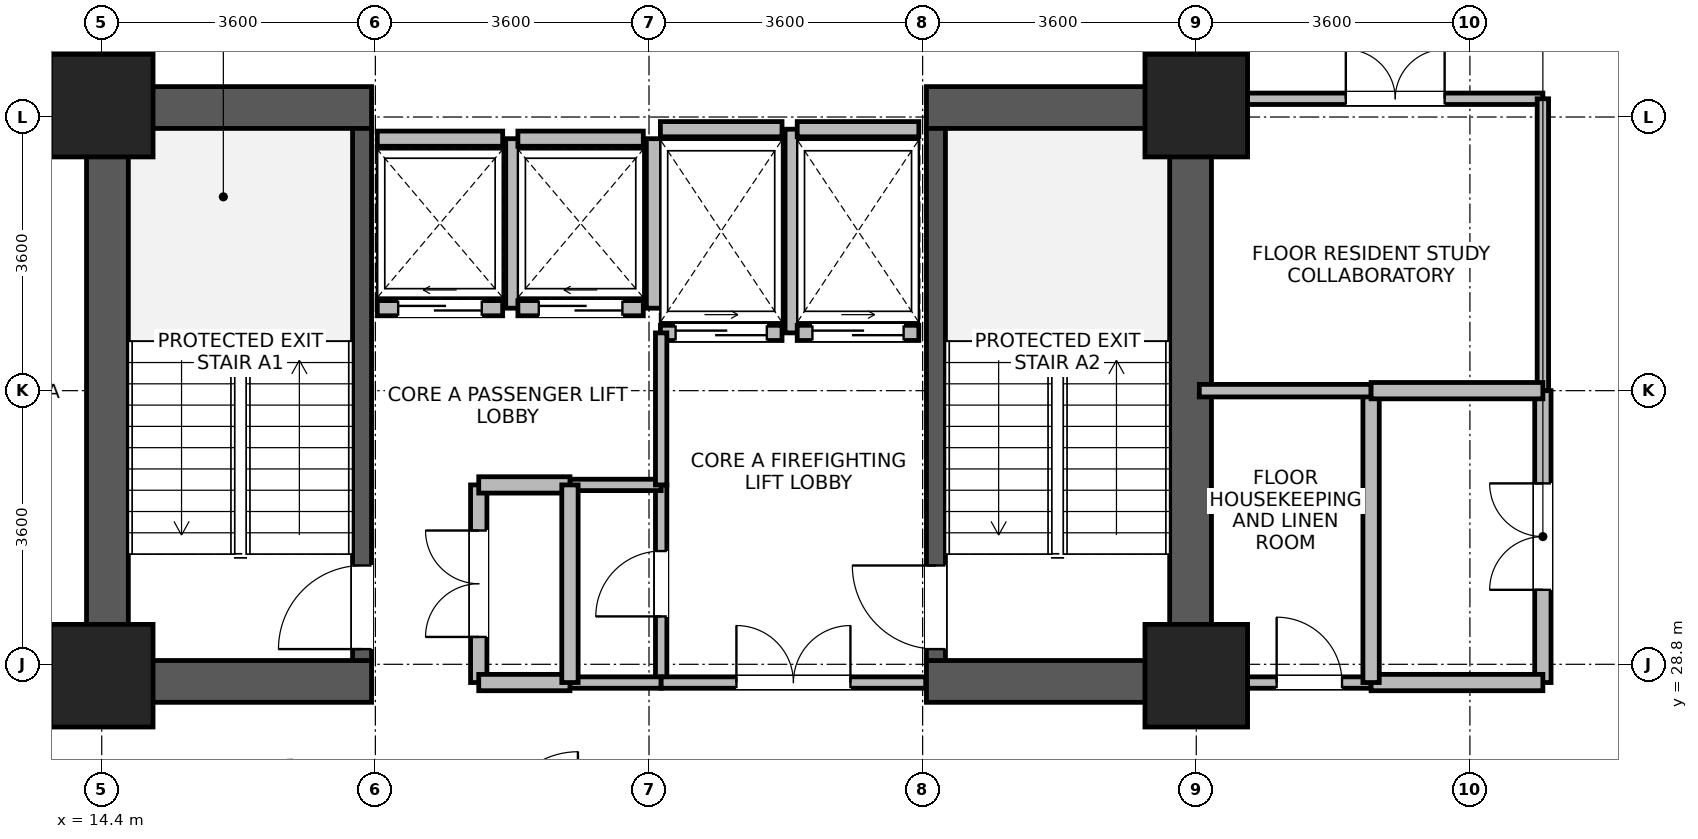
"""IFC4 building model, lengths in metres.
Left out: names, types, materials, properties, quantities, classifications, styles, units other than length and angle.
Written with IfcOpenShell. Run it as: python <this file> out.ifc"""

import sys

from ifc_helpers import new_model, si_unit, direction, frame, frame_2d, origin, origin_2d, place, context, subcontext, project, spatial, rectangle, extrude, source, transform, mapped, element, fill, save


model = new_model("IFC4")
c1 = context("Model", 3, precision=1e-05, world=origin(), true_north=direction((0.0, 1.0)))
c2 = subcontext(c1, "Body", "Model", "MODEL_VIEW")
j1 = project(units=[si_unit("LENGTHUNIT", "METRE"), si_unit("PLANEANGLEUNIT", "RADIAN")], contexts=[c1])
p1 = place(None, origin())
s1 = spatial("IfcSite", under=j1, at=p1, CompositionType="ELEMENT")
p2 = place(p1, origin())
s2 = spatial("IfcBuilding", under=s1, at=p2, CompositionType="ELEMENT")
p3 = place(p2, frame((0.0, 0.0, 47.5)))
s3 = spatial("IfcBuildingStorey", under=s2, at=p3, CompositionType="ELEMENT", Elevation=47.5)
for number, where, z_axis, x_axis in (
    (1, (14.475, 28.3, 0.0), (0.0, 0.0, 1.0), (0.0, 1.0, 0.0)),
    (2, (28.725, 28.3, 0.0), (0.0, 0.0, 1.0), (0.0, 1.0, 0.0)),
):
    element("IfcWall", number, at=place(p3, frame(where, z_axis=z_axis, x_axis=x_axis)), inside=s3, PredefinedType="SHEAR", context=c2, shape_type="SweptSolid", body=[
        extrude(rectangle(XDim=8.1, YDim=0.55, at=frame_2d((4.05, 0.0))), origin(), (0.0, 0.0, 1.0), 3.45),
    ])
for number, where, z_axis, x_axis in (
    (3, (14.75, 28.575, 0.0), (0.0, 0.0, 1.0), (1.0, 0.0, 0.0)),
    (4, (25.25, 28.575, 0.0), (0.0, 0.0, 1.0), (1.0, 0.0, 0.0)),
    (5, (14.75, 36.125, 0.0), (0.0, 0.0, 1.0), (1.0, 0.0, 0.0)),
    (6, (25.25, 36.125, 0.0), (0.0, 0.0, 1.0), (1.0, 0.0, 0.0)),
):
    element("IfcWall", number, at=place(p3, frame(where, z_axis=z_axis, x_axis=x_axis)), inside=s3, PredefinedType="SHEAR", context=c2, shape_type="SweptSolid", body=[
        extrude(rectangle(XDim=3.2, YDim=0.55, at=frame_2d((1.6, 0.0))), origin(), (0.0, 0.0, 1.0), 3.45),
    ])
p4 = place(p3, frame((17.825, 28.85, 0.0), z_axis=(0.0, 0.0, 1.0), x_axis=(0.0, 1.0, 0.0)))
e7 = element("IfcWall", 7, at=p4, inside=s3, PredefinedType="SHEAR", context=c2, shape_type="SweptSolid", body=[
    extrude(rectangle(XDim=7.0, YDim=0.25, at=frame_2d((3.5, 0.0))), origin(), (0.0, 0.0, 1.0), 3.45),
])
p5 = place(p4, frame((0.15, 0.0, 0.0)))
e8 = element("IfcOpeningElement", 8, at=p5, cuts=e7, PredefinedType="OPENING", context=c2, shape_type="SweptSolid", body=[
    extrude(rectangle(XDim=1.1, YDim=2.08, at=frame_2d((0.55, 1.04))), frame((0.0, 0.135, 0.0), z_axis=(0.0, -1.0, 0.0), x_axis=(1.0, 0.0, 0.0)), (0.0, 0.0, 1.0), 0.27),
])
p6 = place(p3, frame((25.375, 28.85, 0.0), z_axis=(0.0, 0.0, 1.0), x_axis=(0.0, 1.0, 0.0)))
e9 = element("IfcWall", 9, at=p6, inside=s3, PredefinedType="SHEAR", context=c2, shape_type="SweptSolid", body=[
    extrude(rectangle(XDim=7.0, YDim=0.25, at=frame_2d((3.5, 0.0))), origin(), (0.0, 0.0, 1.0), 3.45),
])
p7 = place(p6, frame((0.15, 0.0, 0.0)))
e10 = element("IfcOpeningElement", 10, at=p7, cuts=e9, PredefinedType="OPENING", context=c2, shape_type="SweptSolid", body=[
    extrude(rectangle(XDim=1.1, YDim=2.08, at=frame_2d((0.55, 1.04))), frame((0.0, 0.135, 0.0), z_axis=(0.0, -1.0, 0.0), x_axis=(1.0, 0.0, 0.0)), (0.0, 0.0, 1.0), 0.27),
])
m1 = source(origin(), c2, "Body", "SweptSolid", [
    extrude(rectangle(XDim=1.35, YDim=1.35, at=origin_2d()), origin(), (0.0, 0.0, 1.0), 3.7),
])
for number, where, z_axis, x_axis in (
    (11, (14.4, 28.65, 0.0), (0.0, 0.0, 1.0), (1.0, 0.0, 0.0)),
    (12, (14.4, 36.15, 0.0), (0.0, 0.0, 1.0), (1.0, 0.0, 0.0)),
    (13, (28.8, 28.65, 0.0), (0.0, 0.0, 1.0), (1.0, 0.0, 0.0)),
    (14, (28.8, 36.15, 0.0), (0.0, 0.0, 1.0), (1.0, 0.0, 0.0)),
):
    element("IfcColumn", number, at=place(p3, frame(where, z_axis=z_axis, x_axis=x_axis)), inside=s3, PredefinedType="COLUMN", context=c2, shape_type="MappedRepresentation", body=[
        mapped(m1, transform((0.0, 0.0, 0.0), x_axis=(1.0, 0.0, 0.0), y_axis=(0.0, 1.0, 0.0), z_axis=(0.0, 0.0, 1.0), scale=1.0)),
    ])
p8 = place(p3, frame((18.025, 33.485, 0.0), z_axis=(0.0, 0.0, 1.0), x_axis=(1.0, 0.0, 0.0)))
e15 = element("IfcWall", 15, at=p8, inside=s3, PredefinedType="PARTITIONING", context=c2, shape_type="SweptSolid", body=[
    extrude(rectangle(XDim=1.65, YDim=0.2, at=frame_2d((0.825, 0.0))), origin(), (0.0, 0.0, 1.0), 3.43),
])
p9 = place(p8, frame((0.275, 0.0, 0.0)))
e16 = element("IfcOpeningElement", 16, at=p9, cuts=e15, PredefinedType="OPENING", context=c2, shape_type="SweptSolid", body=[
    extrude(rectangle(XDim=1.1, YDim=2.12, at=frame_2d((0.55, 1.06))), frame((0.0, 0.11, 0.0), z_axis=(0.0, -1.0, 0.0), x_axis=(1.0, 0.0, 0.0)), (0.0, 0.0, 1.0), 0.22),
])
p10 = place(p3, frame((18.025, 35.715, 0.0), z_axis=(0.0, 0.0, 1.0), x_axis=(1.0, 0.0, 0.0)))
e17 = element("IfcWall", 17, at=p10, inside=s3, PredefinedType="PARTITIONING", context=c2, shape_type="SweptSolid", body=[
    extrude(rectangle(XDim=1.65, YDim=0.2, at=frame_2d((0.825, 0.0))), origin(), (0.0, 0.0, 1.0), 2.23),
])
p11 = place(p3, frame((19.815, 33.485, 0.0), z_axis=(0.0, 0.0, 1.0), x_axis=(0.0, 1.0, 0.0)))
e18 = element("IfcWall", 18, at=p11, inside=s3, PredefinedType="PARTITIONING", context=c2, shape_type="SweptSolid", body=[
    extrude(rectangle(XDim=2.23, YDim=0.2, at=frame_2d((1.115, 0.0))), origin(), (0.0, 0.0, 1.0), 3.43),
])
p12 = place(p3, frame((19.875, 33.485, 0.0), z_axis=(0.0, 0.0, 1.0), x_axis=(1.0, 0.0, 0.0)))
e19 = element("IfcWall", 19, at=p12, inside=s3, PredefinedType="PARTITIONING", context=c2, shape_type="SweptSolid", body=[
    extrude(rectangle(XDim=1.65, YDim=0.2, at=frame_2d((0.825, 0.0))), origin(), (0.0, 0.0, 1.0), 3.43),
])
p13 = place(p12, frame((0.275, 0.0, 0.0)))
e20 = element("IfcOpeningElement", 20, at=p13, cuts=e19, PredefinedType="OPENING", context=c2, shape_type="SweptSolid", body=[
    extrude(rectangle(XDim=1.1, YDim=2.12, at=frame_2d((0.55, 1.06))), frame((0.0, 0.11, 0.0), z_axis=(0.0, -1.0, 0.0), x_axis=(1.0, 0.0, 0.0)), (0.0, 0.0, 1.0), 0.22),
])
p14 = place(p3, frame((19.875, 35.715, 0.0), z_axis=(0.0, 0.0, 1.0), x_axis=(1.0, 0.0, 0.0)))
e21 = element("IfcWall", 21, at=p14, inside=s3, PredefinedType="PARTITIONING", context=c2, shape_type="SweptSolid", body=[
    extrude(rectangle(XDim=1.65, YDim=0.2, at=frame_2d((0.825, 0.0))), origin(), (0.0, 0.0, 1.0), 2.23),
])
p15 = place(p3, frame((21.665, 33.485, 0.0), z_axis=(0.0, 0.0, 1.0), x_axis=(0.0, 1.0, 0.0)))
e22 = element("IfcWall", 22, at=p15, inside=s3, PredefinedType="PARTITIONING", context=c2, shape_type="SweptSolid", body=[
    extrude(rectangle(XDim=2.23, YDim=0.2, at=frame_2d((1.115, 0.0))), origin(), (0.0, 0.0, 1.0), 3.43),
])
p16 = place(p3, frame((21.75, 33.16, 0.0), z_axis=(0.0, 0.0, 1.0), x_axis=(1.0, 0.0, 0.0)))
e23 = element("IfcWall", 23, at=p16, inside=s3, PredefinedType="PARTITIONING", context=c2, shape_type="SweptSolid", body=[
    extrude(rectangle(XDim=1.6, YDim=0.2, at=frame_2d((0.8, 0.0))), origin(), (0.0, 0.0, 1.0), 3.43),
])
p17 = place(p16, frame((0.2, 0.0, 0.0)))
e24 = element("IfcOpeningElement", 24, at=p17, cuts=e23, PredefinedType="OPENING", context=c2, shape_type="SweptSolid", body=[
    extrude(rectangle(XDim=1.2, YDim=2.12, at=frame_2d((0.6, 1.06))), frame((0.0, 0.11, 0.0), z_axis=(0.0, -1.0, 0.0), x_axis=(1.0, 0.0, 0.0)), (0.0, 0.0, 1.0), 0.22),
])
p18 = place(p3, frame((21.75, 35.84, 0.0), z_axis=(0.0, 0.0, 1.0), x_axis=(1.0, 0.0, 0.0)))
e25 = element("IfcWall", 25, at=p18, inside=s3, PredefinedType="PARTITIONING", context=c2, shape_type="SweptSolid", body=[
    extrude(rectangle(XDim=1.6, YDim=0.2, at=frame_2d((0.8, 0.0))), origin(), (0.0, 0.0, 1.0), 2.23),
])
p19 = place(p3, frame((23.49, 33.16, 0.0), z_axis=(0.0, 0.0, 1.0), x_axis=(0.0, 1.0, 0.0)))
e26 = element("IfcWall", 26, at=p19, inside=s3, PredefinedType="PARTITIONING", context=c2, shape_type="SweptSolid", body=[
    extrude(rectangle(XDim=2.68, YDim=0.2, at=frame_2d((1.34, 0.0))), origin(), (0.0, 0.0, 1.0), 3.43),
])
p20 = place(p3, frame((23.55, 33.16, 0.0), z_axis=(0.0, 0.0, 1.0), x_axis=(1.0, 0.0, 0.0)))
e27 = element("IfcWall", 27, at=p20, inside=s3, PredefinedType="PARTITIONING", context=c2, shape_type="SweptSolid", body=[
    extrude(rectangle(XDim=1.6, YDim=0.2, at=frame_2d((0.8, 0.0))), origin(), (0.0, 0.0, 1.0), 3.43),
])
p21 = place(p20, frame((0.2, 0.0, 0.0)))
e28 = element("IfcOpeningElement", 28, at=p21, cuts=e27, PredefinedType="OPENING", context=c2, shape_type="SweptSolid", body=[
    extrude(rectangle(XDim=1.2, YDim=2.12, at=frame_2d((0.6, 1.06))), frame((0.0, 0.11, 0.0), z_axis=(0.0, -1.0, 0.0), x_axis=(1.0, 0.0, 0.0)), (0.0, 0.0, 1.0), 0.22),
])
p22 = place(p3, frame((23.55, 35.84, 0.0), z_axis=(0.0, 0.0, 1.0), x_axis=(1.0, 0.0, 0.0)))
e29 = element("IfcWall", 29, at=p22, inside=s3, PredefinedType="PARTITIONING", context=c2, shape_type="SweptSolid", body=[
    extrude(rectangle(XDim=1.6, YDim=0.2, at=frame_2d((0.8, 0.0))), origin(), (0.0, 0.0, 1.0), 2.23),
])
p23 = place(p3, frame((29.475, 36.24, 0.0), z_axis=(0.0, 0.0, 1.0), x_axis=(1.0, 0.0, 0.0)))
e30 = element("IfcWall", 30, at=p23, inside=s3, PredefinedType="PARTITIONING", context=c2, shape_type="SweptSolid", body=[
    extrude(rectangle(XDim=3.885, YDim=0.15, at=frame_2d((1.942, 0.0))), origin(), (0.0, 0.0, 1.0), 2.78),
])
p24 = place(p23, frame((1.292, 0.0, 0.0)))
e31 = element("IfcOpeningElement", 31, at=p24, cuts=e30, PredefinedType="OPENING", context=c2, shape_type="SweptSolid", body=[
    extrude(rectangle(XDim=1.3, YDim=2.12, at=frame_2d((0.65, 1.06))), frame((0.0, 0.085, 0.0), z_axis=(0.0, -1.0, 0.0), x_axis=(1.0, 0.0, 0.0)), (0.0, 0.0, 1.0), 0.17),
])
p25 = place(p3, frame((33.36, 32.4, 0.0), z_axis=(0.0, 0.0, 1.0), x_axis=(0.0, 1.0, 0.0)))
e32 = element("IfcWall", 32, at=p25, inside=s3, PredefinedType="PARTITIONING", context=c2, shape_type="SweptSolid", body=[
    extrude(rectangle(XDim=3.84, YDim=0.15, at=frame_2d((1.92, 0.0))), origin(), (0.0, 0.0, 1.0), 3.43),
])
p26 = place(p3, frame((33.36, 28.56, 0.0), z_axis=(0.0, 0.0, 1.0), x_axis=(0.0, 1.0, 0.0)))
e33 = element("IfcWall", 33, at=p26, inside=s3, PredefinedType="PARTITIONING", context=c2, shape_type="SweptSolid", body=[
    extrude(rectangle(XDim=3.84, YDim=0.215, at=frame_2d((1.92, 0.0))), origin(), (0.0, 0.0, 1.0), 3.43),
])
p27 = place(p26, frame((1.22, 0.0, 0.0)))
e34 = element("IfcOpeningElement", 34, at=p27, cuts=e33, PredefinedType="OPENING", context=c2, shape_type="SweptSolid", body=[
    extrude(rectangle(XDim=1.4, YDim=2.15, at=frame_2d((0.7, 1.075))), frame((0.0, 0.118, 0.0), z_axis=(0.0, -1.0, 0.0), x_axis=(1.0, 0.0, 0.0)), (0.0, 0.0, 1.0), 0.235),
])
p28 = place(p3, frame((19.36, 28.56, 0.0), z_axis=(0.0, 0.0, 1.0), x_axis=(0.0, 1.0, 0.0)))
e35 = element("IfcWall", 35, at=p28, inside=s3, PredefinedType="PARTITIONING", context=c2, shape_type="SweptSolid", body=[
    extrude(rectangle(XDim=2.6, YDim=0.215, at=frame_2d((1.3, 0.0))), origin(), (0.0, 0.0, 1.0), 3.43),
])
p29 = place(p28, frame((0.6, 0.0, 0.0)))
e36 = element("IfcOpeningElement", 36, at=p29, cuts=e35, PredefinedType="OPENING", context=c2, shape_type="SweptSolid", body=[
    extrude(rectangle(XDim=1.4, YDim=2.15, at=frame_2d((0.7, 1.075))), frame((0.0, 0.118, 0.0), z_axis=(0.0, -1.0, 0.0), x_axis=(1.0, 0.0, 0.0)), (0.0, 0.0, 1.0), 0.235),
])
p30 = place(p3, frame((21.76, 28.56, 0.0), z_axis=(0.0, 0.0, 1.0), x_axis=(0.0, 1.0, 0.0)))
e37 = element("IfcWall", 37, at=p30, inside=s3, PredefinedType="PARTITIONING", context=c2, shape_type="SweptSolid", body=[
    extrude(rectangle(XDim=2.6, YDim=0.15, at=frame_2d((1.3, 0.0))), origin(), (0.0, 0.0, 1.0), 3.43),
])
p31 = place(p30, frame((0.87, 0.0, 0.0)))
e38 = element("IfcOpeningElement", 38, at=p31, cuts=e37, PredefinedType="OPENING", context=c2, shape_type="SweptSolid", body=[
    extrude(rectangle(XDim=0.86, YDim=2.02, at=frame_2d((0.43, 1.01))), frame((0.0, 0.085, 0.0), z_axis=(0.0, -1.0, 0.0), x_axis=(1.0, 0.0, 0.0)), (0.0, 0.0, 1.0), 0.17),
])
p32 = place(p3, frame((29.475, 28.56, 0.0), z_axis=(0.0, 0.0, 1.0), x_axis=(1.0, 0.0, 0.0)))
e39 = element("IfcWall", 39, at=p32, inside=s3, PredefinedType="PARTITIONING", context=c2, shape_type="SweptSolid", body=[
    extrude(rectangle(XDim=1.625, YDim=0.15, at=frame_2d((0.812, 0.0))), origin(), (0.0, 0.0, 1.0), 2.78),
])
p33 = place(p32, frame((0.383, 0.0, 0.0)))
e40 = element("IfcOpeningElement", 40, at=p33, cuts=e39, PredefinedType="OPENING", context=c2, shape_type="SweptSolid", body=[
    extrude(rectangle(XDim=0.86, YDim=2.02, at=frame_2d((0.43, 1.01))), frame((0.0, 0.085, 0.0), z_axis=(0.0, -1.0, 0.0), x_axis=(1.0, 0.0, 0.0)), (0.0, 0.0, 1.0), 0.17),
])
p34 = place(p3, frame((31.1, 28.56, 0.0), z_axis=(0.0, 0.0, 1.0), x_axis=(1.0, 0.0, 0.0)))
e41 = element("IfcWall", 41, at=p34, inside=s3, PredefinedType="PARTITIONING", context=c2, shape_type="SweptSolid", body=[
    extrude(rectangle(XDim=2.26, YDim=0.215, at=frame_2d((1.13, 0.0))), origin(), (0.0, 0.0, 1.0), 2.78),
])
p35 = place(p3, frame((20.56, 28.56, 0.0), z_axis=(0.0, 0.0, 1.0), x_axis=(1.0, 0.0, 0.0)))
e42 = element("IfcWall", 42, at=p35, inside=s3, PredefinedType="PARTITIONING", context=c2, shape_type="SweptSolid", body=[
    extrude(rectangle(XDim=1.2, YDim=0.15, at=frame_2d((0.6, 0.0))), origin(), (0.0, 0.0, 1.0), 2.23),
])
p36 = place(p3, frame((20.56, 31.16, 0.0), z_axis=(0.0, 0.0, 1.0), x_axis=(1.0, 0.0, 0.0)))
e43 = element("IfcWall", 43, at=p36, inside=s3, PredefinedType="PARTITIONING", context=c2, shape_type="SweptSolid", body=[
    extrude(rectangle(XDim=1.2, YDim=0.15, at=frame_2d((0.6, 0.0))), origin(), (0.0, 0.0, 1.0), 3.43),
])
p37 = place(p3, frame((19.36, 28.56, 0.0), z_axis=(0.0, 0.0, 1.0), x_axis=(1.0, 0.0, 0.0)))
e44 = element("IfcWall", 44, at=p37, inside=s3, PredefinedType="PARTITIONING", context=c2, shape_type="SweptSolid", body=[
    extrude(rectangle(XDim=1.2, YDim=0.215, at=frame_2d((0.6, 0.0))), origin(), (0.0, 0.0, 1.0), 2.23),
])
p38 = place(p3, frame((19.36, 31.16, 0.0), z_axis=(0.0, 0.0, 1.0), x_axis=(1.0, 0.0, 0.0)))
e45 = element("IfcWall", 45, at=p38, inside=s3, PredefinedType="PARTITIONING", context=c2, shape_type="SweptSolid", body=[
    extrude(rectangle(XDim=1.2, YDim=0.215, at=frame_2d((0.6, 0.0))), origin(), (0.0, 0.0, 1.0), 3.43),
])
p39 = place(p3, frame((31.1, 28.56, 0.0), z_axis=(0.0, 0.0, 1.0), x_axis=(0.0, 1.0, 0.0)))
e46 = element("IfcWall", 46, at=p39, inside=s3, PredefinedType="PARTITIONING", context=c2, shape_type="SweptSolid", body=[
    extrude(rectangle(XDim=3.84, YDim=0.215, at=frame_2d((1.92, 0.0))), origin(), (0.0, 0.0, 1.0), 3.43),
])
p40 = place(p3, frame((21.76, 28.56, 0.0), z_axis=(0.0, 0.0, 1.0), x_axis=(1.0, 0.0, 0.0)))
e47 = element("IfcWall", 47, at=p40, inside=s3, PredefinedType="PARTITIONING", context=c2, shape_type="SweptSolid", body=[
    extrude(rectangle(XDim=3.48, YDim=0.15, at=frame_2d((1.74, 0.0))), origin(), (0.0, 0.0, 1.0), 2.23),
])
p41 = place(p40, frame((0.99, 0.0, 0.0)))
e48 = element("IfcOpeningElement", 48, at=p41, cuts=e47, PredefinedType="OPENING", context=c2, shape_type="SweptSolid", body=[
    extrude(rectangle(XDim=1.5, YDim=2.1, at=frame_2d((0.75, 1.05))), frame((0.0, 0.085, 0.0), z_axis=(0.0, -1.0, 0.0), x_axis=(1.0, 0.0, 0.0)), (0.0, 0.0, 1.0), 0.17),
])
p42 = place(p3, frame((20.56, 28.56, 0.0), z_axis=(0.0, 0.0, 1.0), x_axis=(0.0, 1.0, 0.0)))
e49 = element("IfcWall", 49, at=p42, inside=s3, PredefinedType="PARTITIONING", context=c2, shape_type="SweptSolid", body=[
    extrude(rectangle(XDim=2.6, YDim=0.215, at=frame_2d((1.3, 0.0))), origin(), (0.0, 0.0, 1.0), 3.43),
])
p43 = place(p3, frame((28.84, 32.4, 0.0), z_axis=(0.0, 0.0, 1.0), x_axis=(1.0, 0.0, 0.0)))
e50 = element("IfcWall", 50, at=p43, inside=s3, PredefinedType="PARTITIONING", context=c2, shape_type="SweptSolid", body=[
    extrude(rectangle(XDim=2.26, YDim=0.165, at=frame_2d((1.13, 0.0))), origin(), (0.0, 0.0, 1.0), 3.43),
])
p44 = place(p3, frame((31.1, 32.4, 0.0), z_axis=(0.0, 0.0, 1.0), x_axis=(1.0, 0.0, 0.0)))
e51 = element("IfcWall", 51, at=p44, inside=s3, PredefinedType="PARTITIONING", context=c2, shape_type="SweptSolid", body=[
    extrude(rectangle(XDim=2.26, YDim=0.215, at=frame_2d((1.13, 0.0))), origin(), (0.0, 0.0, 1.0), 3.43),
])
p45 = place(p3, frame((21.76, 31.16, 0.0), z_axis=(0.0, 0.0, 1.0), x_axis=(0.0, 1.0, 0.0)))
e52 = element("IfcWall", 52, at=p45, inside=s3, PredefinedType="PARTITIONING", context=c2, shape_type="SweptSolid", body=[
    extrude(rectangle(XDim=2.0, YDim=0.15, at=frame_2d((1.0, 0.0))), origin(), (0.0, 0.0, 1.0), 3.43),
])
p46 = place(p5, origin())
e53 = element("IfcDoor", 53, at=p46, inside=s3, OperationType="SINGLE_SWING_LEFT", PredefinedType="DOOR", context=c2, shape_type="SweptSolid", body=[
    extrude(rectangle(XDim=1.1, YDim=2.08, at=frame_2d((0.55, 1.04))), frame((0.0, 0.025, 0.0), z_axis=(0.0, -1.0, 0.0), x_axis=(1.0, 0.0, 0.0)), (0.0, 0.0, 1.0), 0.05),
])
fill(e8, e53)
p47 = place(p7, origin())
e54 = element("IfcDoor", 54, at=p47, inside=s3, OperationType="SINGLE_SWING_RIGHT", PredefinedType="DOOR", context=c2, shape_type="SweptSolid", body=[
    extrude(rectangle(XDim=1.1, YDim=2.08, at=frame_2d((0.55, 1.04))), frame((0.0, 0.025, 0.0), z_axis=(0.0, -1.0, 0.0), x_axis=(1.0, 0.0, 0.0)), (0.0, 0.0, 1.0), 0.05),
])
fill(e10, e54)
p48 = place(p9, origin())
e55 = element("IfcDoor", 55, at=p48, inside=s3, OperationType="SLIDING_TO_LEFT", PredefinedType="DOOR", context=c2, shape_type="SweptSolid", body=[
    extrude(rectangle(XDim=1.1, YDim=2.12, at=frame_2d((0.55, 1.06))), frame((0.0, 0.025, 0.0), z_axis=(0.0, -1.0, 0.0), x_axis=(1.0, 0.0, 0.0)), (0.0, 0.0, 1.0), 0.05),
])
fill(e16, e55)
p49 = place(p13, origin())
e56 = element("IfcDoor", 56, at=p49, inside=s3, OperationType="SLIDING_TO_LEFT", PredefinedType="DOOR", context=c2, shape_type="SweptSolid", body=[
    extrude(rectangle(XDim=1.1, YDim=2.12, at=frame_2d((0.55, 1.06))), frame((0.0, 0.025, 0.0), z_axis=(0.0, -1.0, 0.0), x_axis=(1.0, 0.0, 0.0)), (0.0, 0.0, 1.0), 0.05),
])
fill(e20, e56)
p50 = place(p17, origin())
e57 = element("IfcDoor", 57, at=p50, inside=s3, OperationType="SLIDING_TO_RIGHT", PredefinedType="DOOR", context=c2, shape_type="SweptSolid", body=[
    extrude(rectangle(XDim=1.2, YDim=2.12, at=frame_2d((0.6, 1.06))), frame((0.0, 0.025, 0.0), z_axis=(0.0, -1.0, 0.0), x_axis=(1.0, 0.0, 0.0)), (0.0, 0.0, 1.0), 0.05),
])
fill(e24, e57)
p51 = place(p21, origin())
e58 = element("IfcDoor", 58, at=p51, inside=s3, OperationType="SLIDING_TO_RIGHT", PredefinedType="DOOR", context=c2, shape_type="SweptSolid", body=[
    extrude(rectangle(XDim=1.2, YDim=2.12, at=frame_2d((0.6, 1.06))), frame((0.0, 0.025, 0.0), z_axis=(0.0, -1.0, 0.0), x_axis=(1.0, 0.0, 0.0)), (0.0, 0.0, 1.0), 0.05),
])
fill(e28, e58)
p52 = place(p24, origin())
e59 = element("IfcDoor", 59, at=p52, inside=s3, OperationType="DOUBLE_DOOR_SINGLE_SWING", PredefinedType="DOOR", context=c2, shape_type="SweptSolid", body=[
    extrude(rectangle(XDim=1.3, YDim=2.12, at=frame_2d((0.65, 1.06))), frame((0.0, 0.025, 0.0), z_axis=(0.0, -1.0, 0.0), x_axis=(1.0, 0.0, 0.0)), (0.0, 0.0, 1.0), 0.05),
])
fill(e31, e59)
p53 = place(p27, origin())
e60 = element("IfcDoor", 60, at=p53, inside=s3, OperationType="DOUBLE_DOOR_SINGLE_SWING", PredefinedType="DOOR", context=c2, shape_type="SweptSolid", body=[
    extrude(rectangle(XDim=1.4, YDim=2.15, at=frame_2d((0.7, 1.075))), frame((0.0, 0.025, 0.0), z_axis=(0.0, -1.0, 0.0), x_axis=(1.0, 0.0, 0.0)), (0.0, 0.0, 1.0), 0.05),
])
fill(e34, e60)
p54 = place(p29, origin())
e61 = element("IfcDoor", 61, at=p54, inside=s3, OperationType="DOUBLE_DOOR_SINGLE_SWING", PredefinedType="DOOR", context=c2, shape_type="SweptSolid", body=[
    extrude(rectangle(XDim=1.4, YDim=2.15, at=frame_2d((0.7, 1.075))), frame((0.0, 0.025, 0.0), z_axis=(0.0, -1.0, 0.0), x_axis=(1.0, 0.0, 0.0)), (0.0, 0.0, 1.0), 0.05),
])
fill(e36, e61)
p55 = place(p31, origin())
e62 = element("IfcDoor", 62, at=p55, inside=s3, OperationType="SINGLE_SWING_LEFT", PredefinedType="DOOR", context=c2, shape_type="SweptSolid", body=[
    extrude(rectangle(XDim=0.86, YDim=2.02, at=frame_2d((0.43, 1.01))), frame((0.0, 0.025, 0.0), z_axis=(0.0, -1.0, 0.0), x_axis=(1.0, 0.0, 0.0)), (0.0, 0.0, 1.0), 0.05),
])
fill(e38, e62)
p56 = place(p33, origin())
e63 = element("IfcDoor", 63, at=p56, inside=s3, OperationType="SINGLE_SWING_LEFT", PredefinedType="DOOR", context=c2, shape_type="SweptSolid", body=[
    extrude(rectangle(XDim=0.86, YDim=2.02, at=frame_2d((0.43, 1.01))), frame((0.0, 0.025, 0.0), z_axis=(0.0, -1.0, 0.0), x_axis=(1.0, 0.0, 0.0)), (0.0, 0.0, 1.0), 0.05),
])
fill(e40, e63)
p57 = place(p41, origin())
e64 = element("IfcDoor", 64, at=p57, inside=s3, OperationType="DOUBLE_DOOR_SINGLE_SWING", PredefinedType="DOOR", context=c2, shape_type="SweptSolid", body=[
    extrude(rectangle(XDim=1.5, YDim=2.1, at=frame_2d((0.75, 1.05))), frame((0.0, 0.025, 0.0), z_axis=(0.0, -1.0, 0.0), x_axis=(1.0, 0.0, 0.0)), (0.0, 0.0, 1.0), 0.05),
])
fill(e48, e64)
save(model, sys.argv[1])
